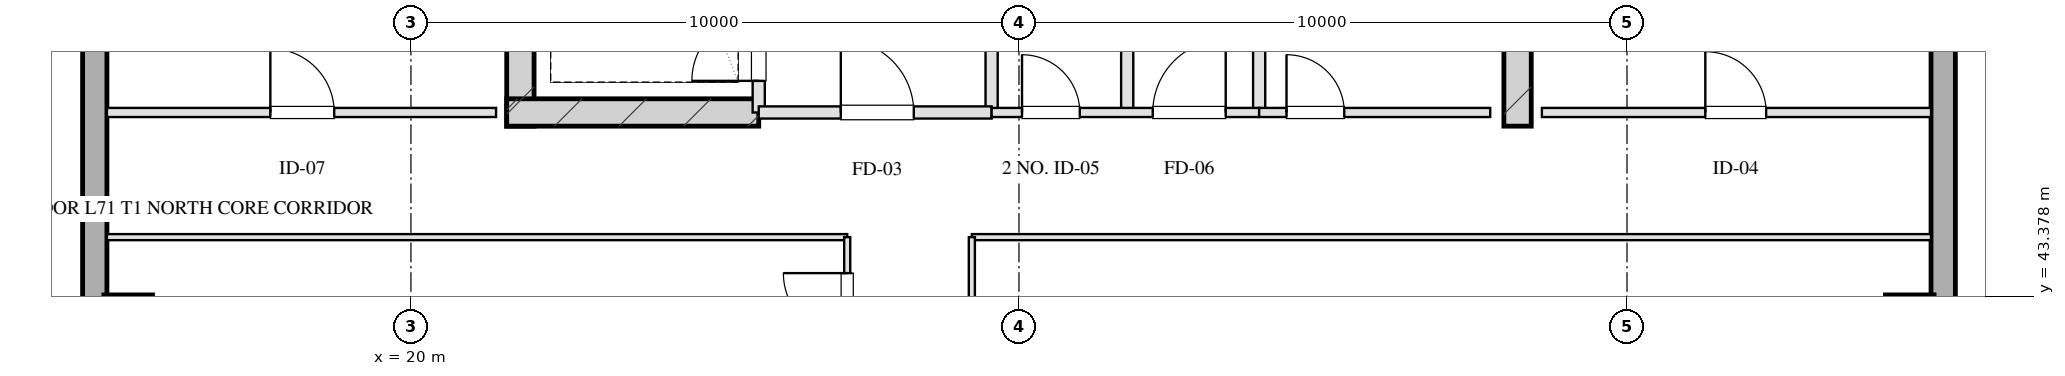
"""IFC4 building model, lengths in metres.
Left out: names, types, materials, properties, quantities, classifications, styles, units other than length and angle.
Written with IfcOpenShell. Run it as: python <this file> out.ifc"""

import sys

from ifc_helpers import new_model, si_unit, direction, frame, frame_2d, origin, origin_2d, place, context, subcontext, project, spatial, rectangle, hollow_rectangle, extrude, element, fill, save


model = new_model("IFC4")
c1 = context("Model", 3, precision=1e-05, world=origin(), true_north=direction((0.0, 1.0)))
c2 = subcontext(c1, "Body", "Model", "MODEL_VIEW")
j1 = project(units=[si_unit("LENGTHUNIT", "METRE"), si_unit("PLANEANGLEUNIT", "RADIAN")], contexts=[c1])
p1 = place(None, origin())
s1 = spatial("IfcSite", under=j1, at=p1, CompositionType="ELEMENT")
p2 = place(p1, origin())
s2 = spatial("IfcBuilding", under=s1, at=p2, CompositionType="ELEMENT")
p3 = place(p2, frame((0.0, 0.0, 260.0)))
s3 = spatial("IfcBuildingStorey", under=s2, at=p3, CompositionType="ELEMENT", Elevation=260.0)
for number, where, z_axis, x_axis in (
    (1, (21.8, 46.175, 0.0), (0.0, 0.0, 1.0), (0.0, 1.0, 0.0)),
    (2, (38.2, 46.175, 0.0), (0.0, 0.0, 1.0), (0.0, 1.0, 0.0)),
):
    element("IfcWall", number, at=place(p3, frame(where, z_axis=z_axis, x_axis=x_axis)), inside=s3, PredefinedType="SHEAR", context=c2, shape_type="SweptSolid", body=[
        extrude(rectangle(XDim=9.33, YDim=0.45, at=frame_2d((4.665, 0.0))), origin(), (0.0, 0.0, 1.0), 3.2),
    ])
p4 = place(p3, frame((21.575, 46.4, 0.0), z_axis=(0.0, 0.0, 1.0), x_axis=(1.0, 0.0, 0.0)))
e3 = element("IfcWall", 3, at=p4, inside=s3, PredefinedType="SHEAR", context=c2, shape_type="SweptSolid", body=[
    extrude(rectangle(XDim=4.145, YDim=0.45, at=frame_2d((2.073, 0.0))), origin(), (0.0, 0.0, 1.0), 3.2),
])
for number, where, z_axis, x_axis in (
    (4, (15.35, 43.0, 0.0), (0.0, 0.0, 1.0), (1.0, 0.0, 0.0)),
    (5, (44.65, 43.0, 0.0), (0.0, 0.0, 1.0), (1.0, 0.0, 0.0)),
):
    element("IfcColumn", number, at=place(p3, frame(where, z_axis=z_axis, x_axis=x_axis)), inside=s3, PredefinedType="COLUMN", context=c2, shape_type="SweptSolid", body=[
        extrude(hollow_rectangle(XDim=0.8, YDim=0.8, WallThickness=0.028, at=origin_2d()), origin(), (0.0, 0.0, 1.0), 3.201),
    ])
p5 = place(p3, frame((14.8, 13.1, 0.0), z_axis=(0.0, 0.0, 1.0), x_axis=(0.0, 1.0, 0.0)))
e6 = element("IfcWall", 6, at=p5, inside=s3, PredefinedType="SOLIDWALL", context=c2, shape_type="SweptSolid", body=[
    extrude(rectangle(XDim=41.8, YDim=0.4, at=frame_2d((20.9, 0.0))), origin(), (0.0, 0.0, 1.0), 2.36),
])
p6 = place(p5, frame((13.525, 0.0, 0.75)))
e7 = element("IfcOpeningElement", 7, at=p6, cuts=e6, PredefinedType="OPENING", context=c2, shape_type="SweptSolid", body=[
    extrude(rectangle(XDim=1.95, YDim=1.21, at=frame_2d((0.975, 0.605))), frame((0.0, 0.21, 0.0), z_axis=(0.0, -1.0, 0.0), x_axis=(1.0, 0.0, 0.0)), (0.0, 0.0, 1.0), 0.42),
])
p7 = place(p5, frame((17.325, 0.0, 0.75)))
e8 = element("IfcOpeningElement", 8, at=p7, cuts=e6, PredefinedType="OPENING", context=c2, shape_type="SweptSolid", body=[
    extrude(rectangle(XDim=1.95, YDim=1.21, at=frame_2d((0.975, 0.605))), frame((0.0, 0.21, 0.0), z_axis=(0.0, -1.0, 0.0), x_axis=(1.0, 0.0, 0.0)), (0.0, 0.0, 1.0), 0.42),
])
p8 = place(p5, frame((23.43, 0.0, 0.0)))
e9 = element("IfcOpeningElement", 9, at=p8, cuts=e6, PredefinedType="OPENING", context=c2, shape_type="SweptSolid", body=[
    extrude(rectangle(XDim=1.1, YDim=2.15, at=frame_2d((0.55, 1.075))), frame((0.0, 0.21, 0.0), z_axis=(0.0, -1.0, 0.0), x_axis=(1.0, 0.0, 0.0)), (0.0, 0.0, 1.0), 0.42),
])
p9 = place(p3, frame((45.2, 54.9, 0.0), z_axis=(0.0, 0.0, 1.0), x_axis=(0.0, -1.0, 0.0)))
e10 = element("IfcWall", 10, at=p9, inside=s3, PredefinedType="SOLIDWALL", context=c2, shape_type="SweptSolid", body=[
    extrude(rectangle(XDim=41.8, YDim=0.4, at=frame_2d((20.9, 0.0))), origin(), (0.0, 0.0, 1.0), 2.36),
])
p10 = place(p9, frame((26.325, 0.0, 0.75)))
e11 = element("IfcOpeningElement", 11, at=p10, cuts=e10, PredefinedType="OPENING", context=c2, shape_type="SweptSolid", body=[
    extrude(rectangle(XDim=1.95, YDim=1.21, at=frame_2d((0.975, 0.605))), frame((0.0, 0.21, 0.0), z_axis=(0.0, -1.0, 0.0), x_axis=(1.0, 0.0, 0.0)), (0.0, 0.0, 1.0), 0.42),
])
p11 = place(p9, frame((22.525, 0.0, 0.75)))
e12 = element("IfcOpeningElement", 12, at=p11, cuts=e10, PredefinedType="OPENING", context=c2, shape_type="SweptSolid", body=[
    extrude(rectangle(XDim=1.95, YDim=1.21, at=frame_2d((0.975, 0.605))), frame((0.0, 0.21, 0.0), z_axis=(0.0, -1.0, 0.0), x_axis=(1.0, 0.0, 0.0)), (0.0, 0.0, 1.0), 0.42),
])
p12 = place(p9, frame((17.25, 0.0, 0.0)))
e13 = element("IfcOpeningElement", 13, at=p12, cuts=e10, PredefinedType="OPENING", context=c2, shape_type="SweptSolid", body=[
    extrude(rectangle(XDim=1.1, YDim=2.15, at=frame_2d((0.55, 1.075))), frame((0.0, 0.21, 0.0), z_axis=(0.0, -1.0, 0.0), x_axis=(1.0, 0.0, 0.0)), (0.0, 0.0, 1.0), 0.42),
])
p13 = place(p3, frame((25.72, 46.4, 0.0), z_axis=(0.0, 0.0, 1.0), x_axis=(0.0, 1.0, 0.0)))
e14 = element("IfcWall", 14, at=p13, inside=s3, PredefinedType="PARTITIONING", context=c2, shape_type="SweptSolid", body=[
    extrude(rectangle(XDim=1.9, YDim=0.2, at=frame_2d((0.95, 0.0))), origin(), (0.0, 0.0, 1.0), 2.925),
])
p14 = place(p13, frame((0.52, 0.0, 0.0)))
e15 = element("IfcOpeningElement", 15, at=p14, cuts=e14, PredefinedType="OPENING", context=c2, shape_type="SweptSolid", body=[
    extrude(rectangle(XDim=1.1, YDim=2.05, at=frame_2d((0.55, 1.025))), frame((0.0, 0.11, 0.0), z_axis=(0.0, -1.0, 0.0), x_axis=(1.0, 0.0, 0.0)), (0.0, 0.0, 1.0), 0.22),
])
p15 = place(p3, frame((29.55, 46.4, 0.0), z_axis=(0.0, 0.0, 1.0), x_axis=(0.0, 1.0, 0.0)))
e16 = element("IfcWall", 16, at=p15, inside=s3, PredefinedType="PARTITIONING", context=c2, shape_type="SweptSolid", body=[
    extrude(rectangle(XDim=8.43, YDim=0.2, at=frame_2d((4.215, 0.0))), origin(), (0.0, 0.0, 1.0), 2.925),
])
p16 = place(p3, frame((25.72, 46.4, 0.0), z_axis=(0.0, 0.0, 1.0), x_axis=(1.0, 0.0, 0.0)))
e17 = element("IfcWall", 17, at=p16, inside=s3, PredefinedType="PARTITIONING", context=c2, shape_type="SweptSolid", body=[
    extrude(rectangle(XDim=3.83, YDim=0.2, at=frame_2d((1.915, 0.0))), origin(), (0.0, 0.0, 1.0), 2.925),
])
p17 = place(p16, frame((1.35, 0.0, 0.0)))
e18 = element("IfcOpeningElement", 18, at=p17, cuts=e17, PredefinedType="OPENING", context=c2, shape_type="SweptSolid", body=[
    extrude(rectangle(XDim=1.2, YDim=2.05, at=frame_2d((0.6, 1.025))), frame((0.0, 0.11, 0.0), z_axis=(0.0, -1.0, 0.0), x_axis=(1.0, 0.0, 0.0)), (0.0, 0.0, 1.0), 0.22),
])
for number, where, z_axis, x_axis in (
    (19, (33.95, 46.4, 0.0), (0.0, 0.0, 1.0), (0.0, 1.0, 0.0)),
    (20, (31.78, 46.4, 0.0), (0.0, 0.0, 1.0), (0.0, 1.0, 0.0)),
):
    element("IfcWall", number, at=place(p3, frame(where, z_axis=z_axis, x_axis=x_axis)), inside=s3, PredefinedType="PARTITIONING", context=c2, shape_type="SweptSolid", body=[
        extrude(rectangle(XDim=8.43, YDim=0.2, at=frame_2d((4.215, 0.0))), origin(), (0.0, 0.0, 1.0), 2.925),
    ])
p18 = place(p3, frame((29.55, 46.4, 0.0), z_axis=(0.0, 0.0, 1.0), x_axis=(1.0, 0.0, 0.0)))
e21 = element("IfcWall", 21, at=p18, inside=s3, PredefinedType="PARTITIONING", context=c2, shape_type="SweptSolid", body=[
    extrude(rectangle(XDim=4.4, YDim=0.15, at=frame_2d((2.2, 0.0))), origin(), (0.0, 0.0, 1.0), 2.925),
])
p19 = place(p18, frame((0.5, 0.0, 0.0)))
e22 = element("IfcOpeningElement", 22, at=p19, cuts=e21, PredefinedType="OPENING", context=c2, shape_type="SweptSolid", body=[
    extrude(rectangle(XDim=0.95, YDim=2.05, at=frame_2d((0.475, 1.025))), frame((0.0, 0.085, 0.0), z_axis=(0.0, -1.0, 0.0), x_axis=(1.0, 0.0, 0.0)), (0.0, 0.0, 1.0), 0.17),
])
p20 = place(p18, frame((2.65, 0.0, 0.0)))
e23 = element("IfcOpeningElement", 23, at=p20, cuts=e21, PredefinedType="OPENING", context=c2, shape_type="SweptSolid", body=[
    extrude(rectangle(XDim=1.2, YDim=2.05, at=frame_2d((0.6, 1.025))), frame((0.0, 0.085, 0.0), z_axis=(0.0, -1.0, 0.0), x_axis=(1.0, 0.0, 0.0)), (0.0, 0.0, 1.0), 0.17),
])
p21 = place(p3, frame((33.95, 46.4, 0.0), z_axis=(0.0, 0.0, 1.0), x_axis=(1.0, 0.0, 0.0)))
e24 = element("IfcWall", 24, at=p21, inside=s3, PredefinedType="PARTITIONING", context=c2, shape_type="SweptSolid", body=[
    extrude(rectangle(XDim=3.8, YDim=0.15, at=frame_2d((1.9, 0.0))), origin(), (0.0, 0.0, 1.0), 2.925),
])
p22 = place(p21, frame((0.45, 0.0, 0.0)))
e25 = element("IfcOpeningElement", 25, at=p22, cuts=e24, PredefinedType="OPENING", context=c2, shape_type="SweptSolid", body=[
    extrude(rectangle(XDim=0.95, YDim=2.05, at=frame_2d((0.475, 1.025))), frame((0.0, 0.085, 0.0), z_axis=(0.0, -1.0, 0.0), x_axis=(1.0, 0.0, 0.0)), (0.0, 0.0, 1.0), 0.17),
])
p23 = place(p3, frame((15.0, 46.4, 0.0), z_axis=(0.0, 0.0, 1.0), x_axis=(1.0, 0.0, 0.0)))
e26 = element("IfcWall", 26, at=p23, inside=s3, PredefinedType="PARTITIONING", context=c2, shape_type="SweptSolid", body=[
    extrude(rectangle(XDim=6.4, YDim=0.15, at=frame_2d((3.2, 0.0))), origin(), (0.0, 0.0, 1.0), 2.925),
])
p24 = place(p23, frame((2.688, 0.0, 0.0)))
e27 = element("IfcOpeningElement", 27, at=p24, cuts=e26, PredefinedType="OPENING", context=c2, shape_type="SweptSolid", body=[
    extrude(rectangle(XDim=1.05, YDim=2.05, at=frame_2d((0.525, 1.025))), frame((0.0, 0.085, 0.0), z_axis=(0.0, -1.0, 0.0), x_axis=(1.0, 0.0, 0.0)), (0.0, 0.0, 1.0), 0.17),
])
p25 = place(p3, frame((38.6, 46.4, 0.0), z_axis=(0.0, 0.0, 1.0), x_axis=(1.0, 0.0, 0.0)))
e28 = element("IfcWall", 28, at=p25, inside=s3, PredefinedType="PARTITIONING", context=c2, shape_type="SweptSolid", body=[
    extrude(rectangle(XDim=6.4, YDim=0.15, at=frame_2d((3.2, 0.0))), origin(), (0.0, 0.0, 1.0), 2.925),
])
p26 = place(p25, frame((2.688, 0.0, 0.0)))
e29 = element("IfcOpeningElement", 29, at=p26, cuts=e28, PredefinedType="OPENING", context=c2, shape_type="SweptSolid", body=[
    extrude(rectangle(XDim=1.0, YDim=2.05, at=frame_2d((0.5, 1.025))), frame((0.0, 0.085, 0.0), z_axis=(0.0, -1.0, 0.0), x_axis=(1.0, 0.0, 0.0)), (0.0, 0.0, 1.0), 0.17),
])
p27 = place(p3, frame((15.0, 44.35, 0.0), z_axis=(0.0, 0.0, 1.0), x_axis=(1.0, 0.0, 0.0)))
e30 = element("IfcWall", 30, at=p27, inside=s3, PredefinedType="MOVABLE", context=c2, shape_type="SweptSolid", body=[
    extrude(rectangle(XDim=12.175, YDim=0.1, at=frame_2d((6.087, 0.0))), origin(), (0.0, 0.0, 1.0), 2.925),
])
p28 = place(p3, frame((29.225, 44.35, 0.0), z_axis=(0.0, 0.0, 1.0), x_axis=(1.0, 0.0, 0.0)))
e31 = element("IfcWall", 31, at=p28, inside=s3, PredefinedType="MOVABLE", context=c2, shape_type="SweptSolid", body=[
    extrude(rectangle(XDim=15.775, YDim=0.1, at=frame_2d((7.887, 0.0))), origin(), (0.0, 0.0, 1.0), 2.925),
])
p29 = place(p3, frame((27.175, 23.65, 0.0), z_axis=(0.0, 0.0, 1.0), x_axis=(0.0, 1.0, 0.0)))
e32 = element("IfcWall", 32, at=p29, inside=s3, PredefinedType="MOVABLE", context=c2, shape_type="SweptSolid", body=[
    extrude(rectangle(XDim=20.7, YDim=0.1, at=frame_2d((10.35, 0.0))), origin(), (0.0, 0.0, 1.0), 2.925),
])
p30 = place(p29, frame((0.775, 0.0, 0.0)))
e33 = element("IfcOpeningElement", 33, at=p30, cuts=e32, PredefinedType="OPENING", context=c2, shape_type="SweptSolid", body=[
    extrude(rectangle(XDim=1.0, YDim=2.05, at=frame_2d((0.5, 1.025))), frame((0.0, 0.06, 0.0), z_axis=(0.0, -1.0, 0.0), x_axis=(1.0, 0.0, 0.0)), (0.0, 0.0, 1.0), 0.12),
])
p31 = place(p29, frame((3.95, 0.0, 0.0)))
e34 = element("IfcOpeningElement", 34, at=p31, cuts=e32, PredefinedType="OPENING", context=c2, shape_type="SweptSolid", body=[
    extrude(rectangle(XDim=0.85, YDim=2.05, at=frame_2d((0.425, 1.025))), frame((0.0, 0.06, 0.0), z_axis=(0.0, -1.0, 0.0), x_axis=(1.0, 0.0, 0.0)), (0.0, 0.0, 1.0), 0.12),
])
p32 = place(p29, frame((8.364, 0.0, 0.0)))
e35 = element("IfcOpeningElement", 35, at=p32, cuts=e32, PredefinedType="OPENING", context=c2, shape_type="SweptSolid", body=[
    extrude(rectangle(XDim=1.0, YDim=2.05, at=frame_2d((0.5, 1.025))), frame((0.0, 0.06, 0.0), z_axis=(0.0, -1.0, 0.0), x_axis=(1.0, 0.0, 0.0)), (0.0, 0.0, 1.0), 0.12),
])
p33 = place(p29, frame((12.844, 0.0, 0.0)))
e36 = element("IfcOpeningElement", 36, at=p33, cuts=e32, PredefinedType="OPENING", context=c2, shape_type="SweptSolid", body=[
    extrude(rectangle(XDim=1.0, YDim=2.05, at=frame_2d((0.5, 1.025))), frame((0.0, 0.06, 0.0), z_axis=(0.0, -1.0, 0.0), x_axis=(1.0, 0.0, 0.0)), (0.0, 0.0, 1.0), 0.12),
])
p34 = place(p29, frame((16.364, 0.0, 0.0)))
e37 = element("IfcOpeningElement", 37, at=p34, cuts=e32, PredefinedType="OPENING", context=c2, shape_type="SweptSolid", body=[
    extrude(rectangle(XDim=1.0, YDim=2.05, at=frame_2d((0.5, 1.025))), frame((0.0, 0.06, 0.0), z_axis=(0.0, -1.0, 0.0), x_axis=(1.0, 0.0, 0.0)), (0.0, 0.0, 1.0), 0.12),
])
p35 = place(p29, frame((19.058, 0.0, 0.0)))
e38 = element("IfcOpeningElement", 38, at=p35, cuts=e32, PredefinedType="OPENING", context=c2, shape_type="SweptSolid", body=[
    extrude(rectangle(XDim=1.05, YDim=2.05, at=frame_2d((0.525, 1.025))), frame((0.0, 0.06, 0.0), z_axis=(0.0, -1.0, 0.0), x_axis=(1.0, 0.0, 0.0)), (0.0, 0.0, 1.0), 0.12),
])
p36 = place(p3, frame((29.225, 23.65, 0.0), z_axis=(0.0, 0.0, 1.0), x_axis=(0.0, 1.0, 0.0)))
e39 = element("IfcWall", 39, at=p36, inside=s3, PredefinedType="MOVABLE", context=c2, shape_type="SweptSolid", body=[
    extrude(rectangle(XDim=20.7, YDim=0.1, at=frame_2d((10.35, 0.0))), origin(), (0.0, 0.0, 1.0), 2.925),
])
p37 = place(p36, frame((2.175, 0.0, 0.0)))
e40 = element("IfcOpeningElement", 40, at=p37, cuts=e39, PredefinedType="OPENING", context=c2, shape_type="SweptSolid", body=[
    extrude(rectangle(XDim=1.0, YDim=2.05, at=frame_2d((0.5, 1.025))), frame((0.0, 0.06, 0.0), z_axis=(0.0, -1.0, 0.0), x_axis=(1.0, 0.0, 0.0)), (0.0, 0.0, 1.0), 0.12),
])
p38 = place(p36, frame((7.69, 0.0, 0.0)))
e41 = element("IfcOpeningElement", 41, at=p38, cuts=e39, PredefinedType="OPENING", context=c2, shape_type="SweptSolid", body=[
    extrude(rectangle(XDim=1.0, YDim=2.05, at=frame_2d((0.5, 1.025))), frame((0.0, 0.06, 0.0), z_axis=(0.0, -1.0, 0.0), x_axis=(1.0, 0.0, 0.0)), (0.0, 0.0, 1.0), 0.12),
])
p39 = place(p36, frame((12.69, 0.0, 0.0)))
e42 = element("IfcOpeningElement", 42, at=p39, cuts=e39, PredefinedType="OPENING", context=c2, shape_type="SweptSolid", body=[
    extrude(rectangle(XDim=1.0, YDim=2.05, at=frame_2d((0.5, 1.025))), frame((0.0, 0.06, 0.0), z_axis=(0.0, -1.0, 0.0), x_axis=(1.0, 0.0, 0.0)), (0.0, 0.0, 1.0), 0.12),
])
p40 = place(p36, frame((17.525, 0.0, 0.0)))
e43 = element("IfcOpeningElement", 43, at=p40, cuts=e39, PredefinedType="OPENING", context=c2, shape_type="SweptSolid", body=[
    extrude(rectangle(XDim=1.0, YDim=2.05, at=frame_2d((0.5, 1.025))), frame((0.0, 0.06, 0.0), z_axis=(0.0, -1.0, 0.0), x_axis=(1.0, 0.0, 0.0)), (0.0, 0.0, 1.0), 0.12),
])
p41 = place(p14, origin())
e44 = element("IfcDoor", 44, at=p41, inside=s3, OperationType="SINGLE_SWING_LEFT", PredefinedType="DOOR", context=c2, shape_type="SweptSolid", body=[
    extrude(rectangle(XDim=1.1, YDim=2.05, at=frame_2d((0.55, 1.025))), frame((0.0, 0.025, 0.0), z_axis=(0.0, -1.0, 0.0), x_axis=(1.0, 0.0, 0.0)), (0.0, 0.0, 1.0), 0.05),
])
fill(e15, e44)
p42 = place(p17, origin())
e45 = element("IfcDoor", 45, at=p42, inside=s3, OperationType="SINGLE_SWING_LEFT", PredefinedType="DOOR", context=c2, shape_type="SweptSolid", body=[
    extrude(rectangle(XDim=1.2, YDim=2.05, at=frame_2d((0.6, 1.025))), frame((0.0, 0.025, 0.0), z_axis=(0.0, -1.0, 0.0), x_axis=(1.0, 0.0, 0.0)), (0.0, 0.0, 1.0), 0.05),
])
fill(e18, e45)
p43 = place(p19, origin())
e46 = element("IfcDoor", 46, at=p43, inside=s3, OperationType="SINGLE_SWING_LEFT", PredefinedType="DOOR", context=c2, shape_type="SweptSolid", body=[
    extrude(rectangle(XDim=0.95, YDim=2.05, at=frame_2d((0.475, 1.025))), frame((0.0, 0.025, 0.0), z_axis=(0.0, -1.0, 0.0), x_axis=(1.0, 0.0, 0.0)), (0.0, 0.0, 1.0), 0.05),
])
fill(e22, e46)
p44 = place(p20, origin())
e47 = element("IfcDoor", 47, at=p44, inside=s3, OperationType="SINGLE_SWING_RIGHT", PredefinedType="DOOR", context=c2, shape_type="SweptSolid", body=[
    extrude(rectangle(XDim=1.2, YDim=2.05, at=frame_2d((0.6, 1.025))), frame((0.0, 0.025, 0.0), z_axis=(0.0, -1.0, 0.0), x_axis=(1.0, 0.0, 0.0)), (0.0, 0.0, 1.0), 0.05),
])
fill(e23, e47)
p45 = place(p22, origin())
e48 = element("IfcDoor", 48, at=p45, inside=s3, OperationType="SINGLE_SWING_LEFT", PredefinedType="DOOR", context=c2, shape_type="SweptSolid", body=[
    extrude(rectangle(XDim=0.95, YDim=2.05, at=frame_2d((0.475, 1.025))), frame((0.0, 0.025, 0.0), z_axis=(0.0, -1.0, 0.0), x_axis=(1.0, 0.0, 0.0)), (0.0, 0.0, 1.0), 0.05),
])
fill(e25, e48)
p46 = place(p24, origin())
e49 = element("IfcDoor", 49, at=p46, inside=s3, OperationType="SINGLE_SWING_LEFT", PredefinedType="DOOR", context=c2, shape_type="SweptSolid", body=[
    extrude(rectangle(XDim=1.05, YDim=2.05, at=frame_2d((0.525, 1.025))), frame((0.0, 0.025, 0.0), z_axis=(0.0, -1.0, 0.0), x_axis=(1.0, 0.0, 0.0)), (0.0, 0.0, 1.0), 0.05),
])
fill(e27, e49)
p47 = place(p26, origin())
e50 = element("IfcDoor", 50, at=p47, inside=s3, OperationType="SINGLE_SWING_LEFT", PredefinedType="DOOR", context=c2, shape_type="SweptSolid", body=[
    extrude(rectangle(XDim=1.0, YDim=2.05, at=frame_2d((0.5, 1.025))), frame((0.0, 0.025, 0.0), z_axis=(0.0, -1.0, 0.0), x_axis=(1.0, 0.0, 0.0)), (0.0, 0.0, 1.0), 0.05),
])
fill(e29, e50)
p48 = place(p35, origin())
e51 = element("IfcDoor", 51, at=p48, inside=s3, OperationType="SINGLE_SWING_RIGHT", PredefinedType="DOOR", context=c2, shape_type="SweptSolid", body=[
    extrude(rectangle(XDim=1.05, YDim=2.05, at=frame_2d((0.525, 1.025))), frame((0.0, 0.025, 0.0), z_axis=(0.0, -1.0, 0.0), x_axis=(1.0, 0.0, 0.0)), (0.0, 0.0, 1.0), 0.05),
])
fill(e38, e51)
save(model, sys.argv[1])
